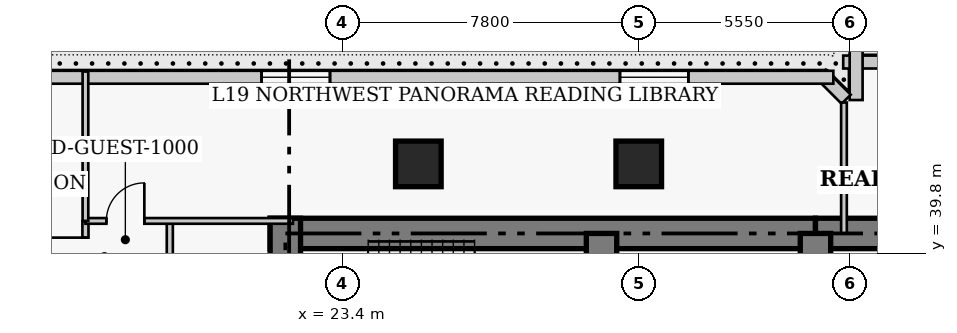
"""IFC4 building model, lengths in metres.
Left out: names, types, materials, properties, quantities, classifications, styles, units other than length and angle.
Written with IfcOpenShell. Run it as: python <this file> out.ifc"""

import sys

from ifc_helpers import new_model, si_unit, direction, frame, frame_2d, origin, origin_2d, place, context, subcontext, project, spatial, rectangle, extrude, element, fill, save


model = new_model("IFC4")
c1 = context("Model", 3, precision=1e-05, world=origin(), true_north=direction((0.0, 1.0)))
c2 = subcontext(c1, "Body", "Model", "MODEL_VIEW")
j1 = project(units=[si_unit("LENGTHUNIT", "METRE"), si_unit("PLANEANGLEUNIT", "RADIAN")], contexts=[c1])
p1 = place(None, origin())
s1 = spatial("IfcSite", under=j1, at=p1, CompositionType="ELEMENT")
p2 = place(p1, origin())
s2 = spatial("IfcBuilding", under=s1, at=p2, CompositionType="ELEMENT")
p3 = place(p2, frame((0.0, 0.0, 80.4)))
s3 = spatial("IfcBuildingStorey", under=s2, at=p3, CompositionType="ELEMENT", Elevation=80.4)
p4 = place(p3, frame((21.5, 40.32, 0.0), z_axis=(0.0, 0.0, 1.0), x_axis=(1.0, 0.0, 0.0)))
e1 = element("IfcWall", 1, at=p4, inside=s3, PredefinedType="SHEAR", context=c2, shape_type="SweptSolid", body=[
    extrude(rectangle(XDim=14.35, YDim=0.8, at=frame_2d((7.175, 0.0))), origin(), (0.0, 0.0, 1.0), 3.8),
])
p5 = place(p3, frame((35.85, 40.32, 0.0), z_axis=(0.0, 0.0, 1.0), x_axis=(1.0, 0.0, 0.0)))
e2 = element("IfcWall", 2, at=p5, inside=s3, PredefinedType="SHEAR", context=c2, shape_type="SweptSolid", body=[
    extrude(rectangle(XDim=12.6, YDim=0.8, at=frame_2d((6.3, 0.0))), origin(), (0.0, 0.0, 1.0), 3.8),
])
p6 = place(p3, frame((21.9, 27.05, 0.0), z_axis=(0.0, 0.0, 1.0), x_axis=(0.0, 1.0, 0.0)))
e3 = element("IfcWall", 3, at=p6, inside=s3, PredefinedType="SHEAR", context=c2, shape_type="SweptSolid", body=[
    extrude(rectangle(XDim=13.67, YDim=0.8, at=frame_2d((6.835, 0.0))), origin(), (0.0, 0.0, 1.0), 3.8),
])
p7 = place(p3, frame((30.22, 33.15, 0.0), z_axis=(0.0, 0.0, 1.0), x_axis=(0.0, 1.0, 0.0)))
e4 = element("IfcWall", 4, at=p7, inside=s3, PredefinedType="SHEAR", context=c2, shape_type="SweptSolid", body=[
    extrude(rectangle(XDim=7.17, YDim=0.8, at=frame_2d((3.585, 0.0))), origin(), (0.0, 0.0, 1.0), 3.8),
])
p8 = place(p3, frame((35.85, 36.37, 0.0), z_axis=(0.0, 0.0, 1.0), x_axis=(0.0, 1.0, 0.0)))
e5 = element("IfcWall", 5, at=p8, inside=s3, PredefinedType="SHEAR", context=c2, shape_type="SweptSolid", body=[
    extrude(rectangle(XDim=3.95, YDim=0.8, at=frame_2d((1.975, 0.0))), origin(), (0.0, 0.0, 1.0), 3.8),
])
p9 = place(p8, frame((0.88, 0.0, 0.0)))
e6 = element("IfcOpeningElement", 6, at=p9, cuts=e5, PredefinedType="OPENING", context=c2, shape_type="SweptSolid", body=[
    extrude(rectangle(XDim=1.1, YDim=2.15, at=frame_2d((0.55, 1.075))), frame((0.0, 0.41, 0.0), z_axis=(0.0, -1.0, 0.0), x_axis=(1.0, 0.0, 0.0)), (0.0, 0.0, 1.0), 0.82),
])
for number, where, z_axis, x_axis in (
    (7, (25.4, 42.15, 0.0), (0.0, 0.0, 1.0), (1.0, 0.0, 0.0)),
    (8, (31.2, 42.15, 0.0), (0.0, 0.0, 1.0), (1.0, 0.0, 0.0)),
):
    element("IfcColumn", number, at=place(p3, frame(where, z_axis=z_axis, x_axis=x_axis)), inside=s3, PredefinedType="COLUMN", context=c2, shape_type="SweptSolid", body=[
        extrude(rectangle(XDim=1.2, YDim=1.2, at=origin_2d()), origin(), (0.0, 0.0, 1.0), 3.8),
    ])
p10 = place(p3, frame((41.42, 44.83, 0.0), z_axis=(0.0, 0.0, 1.0), x_axis=(-1.0, 0.0, 0.0)))
e9 = element("IfcWall", 9, at=p10, inside=s3, PredefinedType="SOLIDWALL", context=c2, shape_type="SweptSolid", body=[
    extrude(rectangle(XDim=4.84, YDim=0.34, at=frame_2d((2.42, 0.0))), origin(), (0.0, 0.0, 1.0), 3.54),
])
p11 = place(p10, frame((1.52, 0.0, 0.85)))
e10 = element("IfcOpeningElement", 10, at=p11, cuts=e9, PredefinedType="OPENING", context=c2, shape_type="SweptSolid", body=[
    extrude(rectangle(XDim=1.8, YDim=1.8, at=frame_2d((0.9, 0.9))), frame((0.0, 0.18, 0.0), z_axis=(0.0, -1.0, 0.0), x_axis=(1.0, 0.0, 0.0)), (0.0, 0.0, 1.0), 0.36),
])
p12 = place(p3, frame((36.92, 45.17, 0.0), z_axis=(0.0, 0.0, 1.0), x_axis=(0.0, -1.0, 0.0)))
e11 = element("IfcWall", 11, at=p12, inside=s3, PredefinedType="SOLIDWALL", context=c2, shape_type="SweptSolid", body=[
    extrude(rectangle(XDim=1.34, YDim=0.34, at=frame_2d((0.67, 0.0))), origin(), (0.0, 0.0, 1.0), 3.54),
])
p13 = place(p3, frame((36.658, 43.852, 0.0), z_axis=(0.0, 0.0, 1.0), x_axis=(-0.707238225886, 0.706975312048, 0.0)))
e12 = element("IfcWall", 12, at=p13, inside=s3, PredefinedType="SOLIDWALL", context=c2, shape_type="SweptSolid", body=[
    extrude(rectangle(XDim=0.929, YDim=0.34, at=frame_2d((0.464, 0.0))), origin(), (0.0, 0.0, 1.0), 3.54),
])
p14 = place(p3, frame((36.32, 44.43, 0.0), z_axis=(0.0, 0.0, 1.0), x_axis=(-1.0, 0.0, 0.0)))
e13 = element("IfcWall", 13, at=p14, inside=s3, PredefinedType="SOLIDWALL", context=c2, shape_type="SweptSolid", body=[
    extrude(rectangle(XDim=28.29, YDim=0.34, at=frame_2d((14.145, 0.0))), origin(), (0.0, 0.0, 1.0), 3.54),
])
p15 = place(p14, frame((3.815, 0.0, 0.85)))
e14 = element("IfcOpeningElement", 14, at=p15, cuts=e13, PredefinedType="OPENING", context=c2, shape_type="SweptSolid", body=[
    extrude(rectangle(XDim=1.8, YDim=1.8, at=frame_2d((0.9, 0.9))), frame((0.0, 0.18, 0.0), z_axis=(0.0, -1.0, 0.0), x_axis=(1.0, 0.0, 0.0)), (0.0, 0.0, 1.0), 0.36),
])
p16 = place(p14, frame((13.245, 0.0, 0.85)))
e15 = element("IfcOpeningElement", 15, at=p16, cuts=e13, PredefinedType="OPENING", context=c2, shape_type="SweptSolid", body=[
    extrude(rectangle(XDim=1.8, YDim=1.8, at=frame_2d((0.9, 0.9))), frame((0.0, 0.18, 0.0), z_axis=(0.0, -1.0, 0.0), x_axis=(1.0, 0.0, 0.0)), (0.0, 0.0, 1.0), 0.36),
])
p17 = place(p14, frame((22.675, 0.0, 0.85)))
e16 = element("IfcOpeningElement", 16, at=p17, cuts=e13, PredefinedType="OPENING", context=c2, shape_type="SweptSolid", body=[
    extrude(rectangle(XDim=1.8, YDim=1.8, at=frame_2d((0.9, 0.9))), frame((0.0, 0.18, 0.0), z_axis=(0.0, -1.0, 0.0), x_axis=(1.0, 0.0, 0.0)), (0.0, 0.0, 1.0), 0.36),
])
p18 = place(p3, frame((16.64, 6.65, 0.0), z_axis=(0.0, 0.0, 1.0), x_axis=(0.0, 1.0, 0.0)))
e17 = element("IfcWall", 17, at=p18, inside=s3, PredefinedType="PARTITIONING", context=c2, shape_type="SweptSolid", body=[
    extrude(rectangle(XDim=34.0, YDim=0.16, at=frame_2d((17.0, 0.0))), origin(), (0.0, 0.0, 1.0), 3.54),
])
p19 = place(p18, frame((1.8, 0.0, 0.0)))
e18 = element("IfcOpeningElement", 18, at=p19, cuts=e17, PredefinedType="OPENING", context=c2, shape_type="SweptSolid", body=[
    extrude(rectangle(XDim=0.95, YDim=2.1, at=frame_2d((0.475, 1.05))), frame((0.0, 0.09, 0.0), z_axis=(0.0, -1.0, 0.0), x_axis=(1.0, 0.0, 0.0)), (0.0, 0.0, 1.0), 0.18),
])
p20 = place(p18, frame((8.475, 0.0, 0.0)))
e19 = element("IfcOpeningElement", 19, at=p20, cuts=e17, PredefinedType="OPENING", context=c2, shape_type="SweptSolid", body=[
    extrude(rectangle(XDim=0.95, YDim=2.1, at=frame_2d((0.475, 1.05))), frame((0.0, 0.09, 0.0), z_axis=(0.0, -1.0, 0.0), x_axis=(1.0, 0.0, 0.0)), (0.0, 0.0, 1.0), 0.18),
])
p21 = place(p18, frame((17.275, 0.0, 0.0)))
e20 = element("IfcOpeningElement", 20, at=p21, cuts=e17, PredefinedType="OPENING", context=c2, shape_type="SweptSolid", body=[
    extrude(rectangle(XDim=0.95, YDim=2.1, at=frame_2d((0.475, 1.05))), frame((0.0, 0.09, 0.0), z_axis=(0.0, -1.0, 0.0), x_axis=(1.0, 0.0, 0.0)), (0.0, 0.0, 1.0), 0.18),
])
p22 = place(p18, frame((25.675, 0.0, 0.0)))
e21 = element("IfcOpeningElement", 21, at=p22, cuts=e17, PredefinedType="OPENING", context=c2, shape_type="SweptSolid", body=[
    extrude(rectangle(XDim=0.95, YDim=2.1, at=frame_2d((0.475, 1.05))), frame((0.0, 0.09, 0.0), z_axis=(0.0, -1.0, 0.0), x_axis=(1.0, 0.0, 0.0)), (0.0, 0.0, 1.0), 0.18),
])
p23 = place(p18, frame((32.56, 0.0, 0.0)))
e22 = element("IfcOpeningElement", 22, at=p23, cuts=e17, PredefinedType="OPENING", context=c2, shape_type="SweptSolid", body=[
    extrude(rectangle(XDim=1.0, YDim=2.15, at=frame_2d((0.5, 1.075))), frame((0.0, 0.09, 0.0), z_axis=(0.0, -1.0, 0.0), x_axis=(1.0, 0.0, 0.0)), (0.0, 0.0, 1.0), 0.18),
])
p24 = place(p3, frame((18.86, 35.02, 0.0), z_axis=(0.0, 0.0, 1.0), x_axis=(0.0, 1.0, 0.0)))
e23 = element("IfcWall", 23, at=p24, inside=s3, PredefinedType="PARTITIONING", context=c2, shape_type="SweptSolid", body=[
    extrude(rectangle(XDim=5.63, YDim=0.16, at=frame_2d((2.815, 0.0))), origin(), (0.0, 0.0, 1.0), 3.54),
])
p25 = place(p3, frame((16.64, 40.65, 0.0), z_axis=(0.0, 0.0, 1.0), x_axis=(1.0, 0.0, 0.0)))
e24 = element("IfcWall", 24, at=p25, inside=s3, PredefinedType="PARTITIONING", context=c2, shape_type="SweptSolid", body=[
    extrude(rectangle(XDim=5.46, YDim=0.15, at=frame_2d((2.73, 0.0))), origin(), (0.0, 0.0, 1.0), 3.54),
])
p26 = place(p25, frame((0.55, 0.0, 0.0)))
e25 = element("IfcOpeningElement", 25, at=p26, cuts=e24, PredefinedType="OPENING", context=c2, shape_type="SweptSolid", body=[
    extrude(rectangle(XDim=1.0, YDim=2.15, at=frame_2d((0.5, 1.075))), frame((0.0, 0.085, 0.0), z_axis=(0.0, -1.0, 0.0), x_axis=(1.0, 0.0, 0.0)), (0.0, 0.0, 1.0), 0.17),
])
p27 = place(p3, frame((16.64, 40.65, 0.0), z_axis=(0.0, 0.0, 1.0), x_axis=(0.0, 1.0, 0.0)))
e26 = element("IfcWall", 26, at=p27, inside=s3, PredefinedType="PARTITIONING", context=c2, shape_type="SweptSolid", body=[
    extrude(rectangle(XDim=3.93, YDim=0.15, at=frame_2d((1.965, 0.0))), origin(), (0.0, 0.0, 1.0), 3.54),
])
p28 = place(p3, frame((36.6, 40.32, 0.0), z_axis=(0.0, 0.0, 1.0), x_axis=(0.0, 1.0, 0.0)))
e27 = element("IfcWall", 27, at=p28, inside=s3, PredefinedType="PARTITIONING", context=c2, shape_type="SweptSolid", body=[
    extrude(rectangle(XDim=3.445, YDim=0.15, at=frame_2d((1.723, 0.0))), origin(), (0.0, 0.0, 1.0), 3.54),
])
p29 = place(p15, origin())
e28 = element("IfcWindow", 28, at=p29, inside=s3, PartitioningType="SINGLE_PANEL", PredefinedType="WINDOW", context=c2, shape_type="SweptSolid", body=[
    extrude(rectangle(XDim=1.8, YDim=1.8, at=frame_2d((0.9, 0.9))), frame((0.0, 0.03, 0.0), z_axis=(0.0, -1.0, 0.0), x_axis=(1.0, 0.0, 0.0)), (0.0, 0.0, 1.0), 0.06),
])
fill(e14, e28)
p30 = place(p16, origin())
e29 = element("IfcWindow", 29, at=p30, inside=s3, PartitioningType="SINGLE_PANEL", PredefinedType="WINDOW", context=c2, shape_type="SweptSolid", body=[
    extrude(rectangle(XDim=1.8, YDim=1.8, at=frame_2d((0.9, 0.9))), frame((0.0, 0.03, 0.0), z_axis=(0.0, -1.0, 0.0), x_axis=(1.0, 0.0, 0.0)), (0.0, 0.0, 1.0), 0.06),
])
fill(e15, e29)
p31 = place(p26, origin())
e30 = element("IfcDoor", 30, at=p31, inside=s3, OperationType="SINGLE_SWING_RIGHT", PredefinedType="DOOR", context=c2, shape_type="SweptSolid", body=[
    extrude(rectangle(XDim=1.0, YDim=2.15, at=frame_2d((0.5, 1.075))), frame((0.0, 0.025, 0.0), z_axis=(0.0, -1.0, 0.0), x_axis=(1.0, 0.0, 0.0)), (0.0, 0.0, 1.0), 0.05),
])
fill(e25, e30)
p32 = place(p23, origin())
e31 = element("IfcDoor", 31, at=p32, inside=s3, OperationType="SINGLE_SWING_RIGHT", PredefinedType="DOOR", context=c2, shape_type="SweptSolid", body=[
    extrude(rectangle(XDim=1.0, YDim=2.15, at=frame_2d((0.5, 1.075))), frame((0.0, 0.025, 0.0), z_axis=(0.0, -1.0, 0.0), x_axis=(1.0, 0.0, 0.0)), (0.0, 0.0, 1.0), 0.05),
])
fill(e22, e31)
save(model, sys.argv[1])
